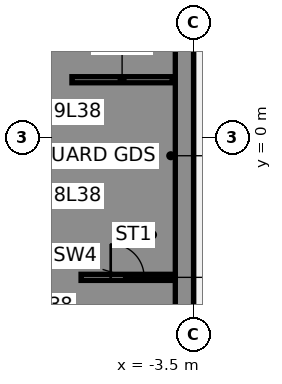
"""IFC4 building model, lengths in metres.
Left out: names, types, materials, properties, quantities, classifications, styles, units other than length and angle.
Written with IfcOpenShell. Run it as: python <this file> out.ifc"""

import sys

from ifc_helpers import new_model, si_unit, direction, frame, frame_2d, origin, place, context, subcontext, project, spatial, polyline, rectangle, outline, extrude, element, fill, save


model = new_model("IFC4")
c1 = context("Model", 3, precision=1e-05, world=origin(), true_north=direction((0.0, 1.0)))
c2 = subcontext(c1, "Body", "Model", "MODEL_VIEW")
j1 = project(units=[si_unit("LENGTHUNIT", "METRE"), si_unit("PLANEANGLEUNIT", "RADIAN")], contexts=[c1])
p1 = place(None, origin())
s1 = spatial("IfcSite", under=j1, at=p1, CompositionType="ELEMENT")
p2 = place(p1, origin())
s2 = spatial("IfcBuilding", under=s1, at=p2, CompositionType="ELEMENT")
p3 = place(p2, frame((0.0, 0.0, 155.5)))
s3 = spatial("IfcBuildingStorey", under=s2, at=p3, CompositionType="ELEMENT", Elevation=155.5)
p4 = place(p3, origin())
e1 = element("IfcWall", 1, at=p4, inside=s3, PredefinedType="SHEAR", context=c2, shape_type="SweptSolid", body=[
    extrude(outline(polyline([(-9.8, -5.375), (-9.8, -5.625), (-7.5, -5.625), (-7.2, -5.625), (-7.2, 8.9), (-7.5, 8.9), (-9.8, 8.9), (-9.8, 8.125), (-7.5, 8.125), (-7.5, 5.625), (-9.8, 5.625), (-9.8, 5.375), (-7.5, 5.375), (-7.5, 2.875), (-9.8, 2.875), (-9.8, 2.625), (-7.5, 2.625), (-7.5, 0.125), (-9.8, 0.125), (-9.8, -0.125), (-7.5, -0.125), (-7.5, -2.625), (-9.8, -2.625), (-9.8, -2.875), (-7.5, -2.875), (-7.5, -5.375), (-9.8, -5.375)])), origin(), (0.0, 0.0, 1.0), 3.61),
])
p5 = place(p3, frame((-7.5, 1.9, 0.0), z_axis=(0.0, 0.0, 1.0), x_axis=(1.0, 0.0, 0.0)))
e2 = element("IfcWall", 2, at=p5, inside=s3, PredefinedType="SHEAR", context=c2, shape_type="SweptSolid", body=[
    extrude(rectangle(XDim=3.3, YDim=0.2, at=frame_2d((1.65, 0.0))), origin(), (0.0, 0.0, 1.0), 3.61),
])
p6 = place(p3, frame((-3.8, -8.9, 0.0), z_axis=(0.0, 0.0, 1.0), x_axis=(0.0, 1.0, 0.0)))
e3 = element("IfcWall", 3, at=p6, inside=s3, PredefinedType="SHEAR", context=c2, shape_type="SweptSolid", body=[
    extrude(rectangle(XDim=17.8, YDim=0.6, at=frame_2d((8.9, 0.0))), origin(), (0.0, 0.0, 1.0), 3.61),
])
p7 = place(p6, frame((1.25, 0.0, 0.0)))
e4 = element("IfcOpeningElement", 4, at=p7, cuts=e3, PredefinedType="OPENING", context=c2, shape_type="SweptSolid", body=[
    extrude(rectangle(XDim=1.8, YDim=2.1, at=frame_2d((0.9, 1.05))), frame((0.0, 0.31, 0.0), z_axis=(0.0, -1.0, 0.0), x_axis=(1.0, 0.0, 0.0)), (0.0, 0.0, 1.0), 0.62),
])
p8 = place(p6, frame((12.377, 0.0, 0.0)))
e5 = element("IfcOpeningElement", 5, at=p8, cuts=e3, PredefinedType="OPENING", context=c2, shape_type="SweptSolid", body=[
    extrude(rectangle(XDim=1.0, YDim=2.1, at=frame_2d((0.5, 1.05))), frame((0.0, 0.31, 0.0), z_axis=(0.0, -1.0, 0.0), x_axis=(1.0, 0.0, 0.0)), (0.0, 0.0, 1.0), 0.62),
])
p9 = place(p6, frame((15.903, 0.0, 0.0)))
e6 = element("IfcOpeningElement", 6, at=p9, cuts=e3, PredefinedType="OPENING", context=c2, shape_type="SweptSolid", body=[
    extrude(rectangle(XDim=1.0, YDim=2.1, at=frame_2d((0.5, 1.05))), frame((0.0, 0.31, 0.0), z_axis=(0.0, -1.0, 0.0), x_axis=(1.0, 0.0, 0.0)), (0.0, 0.0, 1.0), 0.62),
])
p10 = place(p3, frame((-7.2, -4.6, 0.0), z_axis=(0.0, 0.0, 1.0), x_axis=(1.0, 0.0, 0.0)))
e7 = element("IfcWall", 7, at=p10, inside=s3, PredefinedType="SHEAR", context=c2, shape_type="SweptSolid", body=[
    extrude(rectangle(XDim=3.1, YDim=0.2, at=frame_2d((1.55, 0.0))), origin(), (0.0, 0.0, 1.0), 3.61),
])
p11 = place(p10, frame((0.975, 0.0, 0.0)))
e8 = element("IfcOpeningElement", 8, at=p11, cuts=e7, PredefinedType="OPENING", context=c2, shape_type="SweptSolid", body=[
    extrude(rectangle(XDim=1.1, YDim=2.1, at=frame_2d((0.55, 1.05))), frame((0.0, 0.11, 0.0), z_axis=(0.0, -1.0, 0.0), x_axis=(1.0, 0.0, 0.0)), (0.0, 0.0, 1.0), 0.22),
])
p12 = place(p11, origin())
e9 = element("IfcDoor", 9, at=p12, inside=s3, OperationType="SINGLE_SWING_LEFT", PredefinedType="DOOR", context=c2, shape_type="SweptSolid", body=[
    extrude(rectangle(XDim=1.1, YDim=2.1, at=frame_2d((0.55, 1.05))), frame((0.0, 0.025, 0.0), z_axis=(0.0, -1.0, 0.0), x_axis=(1.0, 0.0, 0.0)), (0.0, 0.0, 1.0), 0.05),
])
fill(e8, e9)
save(model, sys.argv[1])
